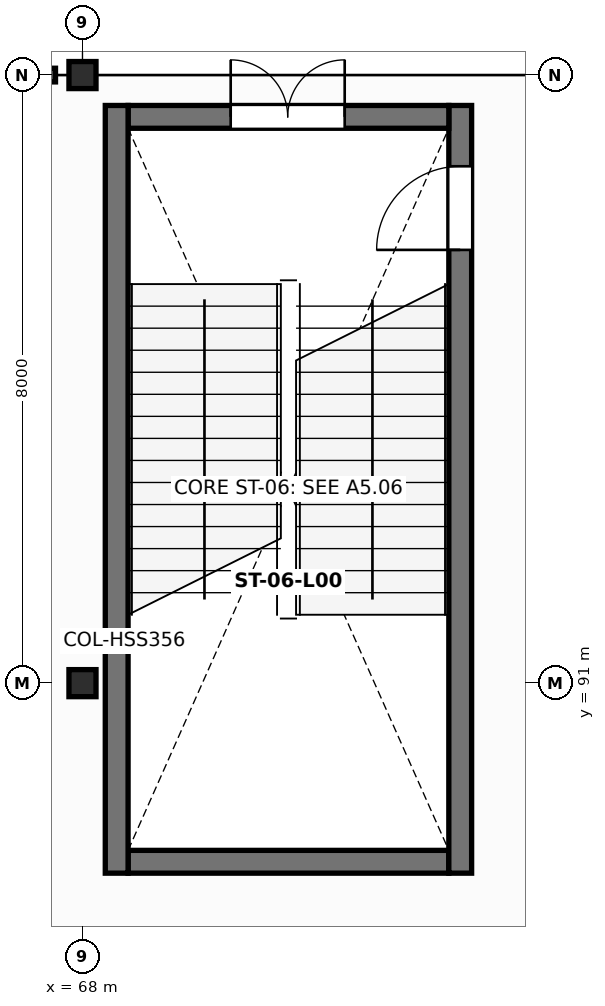
"""IFC4 building model, lengths in metres.
Left out: names, types, materials, properties, quantities, classifications, styles, units other than length and angle.
Written with IfcOpenShell. Run it as: python <this file> out.ifc"""

import sys

from ifc_helpers import new_model, si_unit, direction, frame, frame_2d, origin, origin_2d, place, context, subcontext, project, spatial, rectangle, hollow_rectangle, extrude, element, fill, save


model = new_model("IFC4")
c1 = context("Model", 3, precision=1e-05, world=origin(), true_north=direction((0.0, 1.0)))
c2 = subcontext(c1, "Body", "Model", "MODEL_VIEW")
j1 = project(units=[si_unit("LENGTHUNIT", "METRE"), si_unit("PLANEANGLEUNIT", "RADIAN")], contexts=[c1])
p1 = place(None, origin())
s1 = spatial("IfcSite", under=j1, at=p1, CompositionType="ELEMENT")
p2 = place(p1, origin())
s2 = spatial("IfcBuilding", under=s1, at=p2, CompositionType="ELEMENT")
p3 = place(p2, origin())
s3 = spatial("IfcBuildingStorey", under=s2, at=p3, CompositionType="ELEMENT", Elevation=0.0)
for number, where, z_axis, x_axis in (
    (1, (68.0, 91.0, 0.0), (0.0, 0.0, 1.0), (1.0, 0.0, 0.0)),
    (2, (68.0, 99.0, 0.0), (0.0, 0.0, 1.0), (1.0, 0.0, 0.0)),
):
    element("IfcColumn", number, at=place(p3, frame(where, z_axis=z_axis, x_axis=x_axis)), inside=s3, PredefinedType="COLUMN", context=c2, shape_type="SweptSolid", body=[
        extrude(hollow_rectangle(XDim=0.356, YDim=0.356, WallThickness=0.015, at=origin_2d()), origin(), (0.0, 0.0, 1.0), 6.0),
    ])
p4 = place(p3, frame((68.6, 88.65, 0.0), z_axis=(0.0, 0.0, 1.0), x_axis=(1.0, 0.0, 0.0)))
e3 = element("IfcWall", 3, at=p4, inside=s3, PredefinedType="SHEAR", context=c2, shape_type="SweptSolid", body=[
    extrude(rectangle(XDim=4.22, YDim=0.3, at=frame_2d((2.11, 0.0))), origin(), (0.0, 0.0, 1.0), 5.755),
])
p5 = place(p3, frame((72.97, 88.5, 0.0), z_axis=(0.0, 0.0, 1.0), x_axis=(0.0, 1.0, 0.0)))
e4 = element("IfcWall", 4, at=p5, inside=s3, PredefinedType="SHEAR", context=c2, shape_type="SweptSolid", body=[
    extrude(rectangle(XDim=10.1, YDim=0.3, at=frame_2d((5.05, 0.0))), origin(), (0.0, 0.0, 1.0), 5.755),
])
p6 = place(p5, frame((8.2, 0.0, 0.0)))
e5 = element("IfcOpeningElement", 5, at=p6, cuts=e4, PredefinedType="OPENING", context=c2, shape_type="SweptSolid", body=[
    extrude(rectangle(XDim=1.1, YDim=2.15, at=frame_2d((0.55, 1.075))), frame((0.0, 0.16, 0.0), z_axis=(0.0, -1.0, 0.0), x_axis=(1.0, 0.0, 0.0)), (0.0, 0.0, 1.0), 0.32),
])
p7 = place(p3, frame((72.82, 98.45, 0.0), z_axis=(0.0, 0.0, 1.0), x_axis=(-1.0, 0.0, 0.0)))
e6 = element("IfcWall", 6, at=p7, inside=s3, PredefinedType="SHEAR", context=c2, shape_type="SweptSolid", body=[
    extrude(rectangle(XDim=4.22, YDim=0.3, at=frame_2d((2.11, 0.0))), origin(), (0.0, 0.0, 1.0), 5.755),
])
p8 = place(p7, frame((1.37, 0.0, 0.0)))
e7 = element("IfcOpeningElement", 7, at=p8, cuts=e6, PredefinedType="OPENING", context=c2, shape_type="SweptSolid", body=[
    extrude(rectangle(XDim=1.5, YDim=2.2, at=frame_2d((0.75, 1.1))), frame((0.0, 0.16, 0.0), z_axis=(0.0, -1.0, 0.0), x_axis=(1.0, 0.0, 0.0)), (0.0, 0.0, 1.0), 0.32),
])
p9 = place(p3, frame((68.45, 98.6, 0.0), z_axis=(0.0, 0.0, 1.0), x_axis=(0.0, -1.0, 0.0)))
e8 = element("IfcWall", 8, at=p9, inside=s3, PredefinedType="SHEAR", context=c2, shape_type="SweptSolid", body=[
    extrude(rectangle(XDim=10.1, YDim=0.3, at=frame_2d((5.05, 0.0))), origin(), (0.0, 0.0, 1.0), 5.755),
])
p10 = place(p6, origin())
e9 = element("IfcDoor", 9, at=p10, inside=s3, OperationType="SINGLE_SWING_LEFT", PredefinedType="DOOR", context=c2, shape_type="SweptSolid", body=[
    extrude(rectangle(XDim=1.1, YDim=2.15, at=frame_2d((0.55, 1.075))), frame((0.0, 0.025, 0.0), z_axis=(0.0, -1.0, 0.0), x_axis=(1.0, 0.0, 0.0)), (0.0, 0.0, 1.0), 0.05),
])
fill(e5, e9)
p11 = place(p8, frame((1.5, 0.0, 0.0), z_axis=(0.0, 0.0, 1.0), x_axis=(-1.0, 0.0, 0.0)))
e10 = element("IfcDoor", 10, at=p11, inside=s3, OperationType="DOUBLE_DOOR_SINGLE_SWING", PredefinedType="DOOR", context=c2, shape_type="SweptSolid", body=[
    extrude(rectangle(XDim=1.5, YDim=2.2, at=frame_2d((0.75, 1.1))), frame((0.0, 0.025, 0.0), z_axis=(0.0, -1.0, 0.0), x_axis=(1.0, 0.0, 0.0)), (0.0, 0.0, 1.0), 0.05),
])
fill(e7, e10)
save(model, sys.argv[1])
